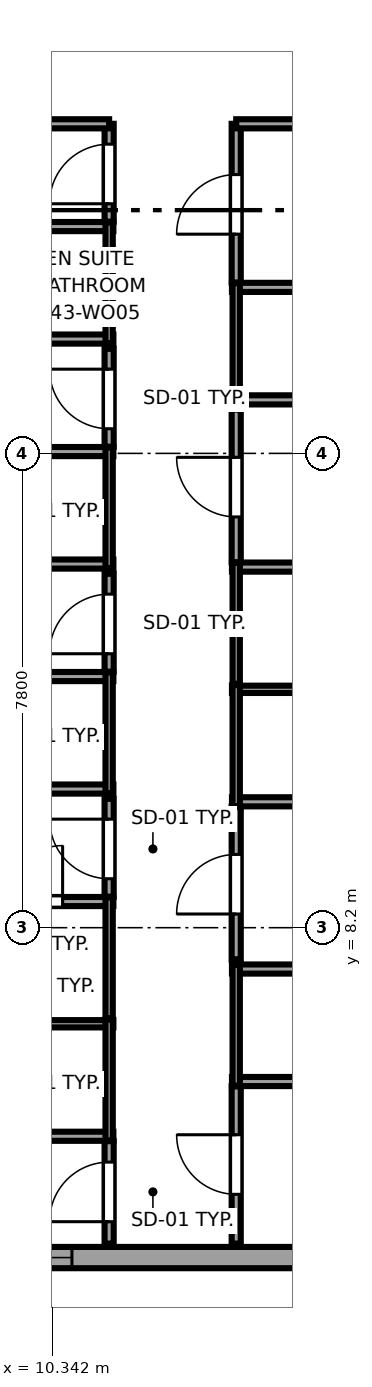
"""IFC4 building model, lengths in metres.
Left out: names, types, materials, properties, quantities, classifications, styles, units other than length and angle.
Written with IfcOpenShell. Run it as: python <this file> out.ifc"""

import sys

from ifc_helpers import new_model, si_unit, direction, frame, frame_2d, origin, place, context, subcontext, project, spatial, rectangle, extrude, source, transform, mapped, element, fill, save


model = new_model("IFC4")
c1 = context("Model", 3, precision=1e-05, world=origin(), true_north=direction((0.0, 1.0)))
c2 = subcontext(c1, "Body", "Model", "MODEL_VIEW")
j1 = project(units=[si_unit("LENGTHUNIT", "METRE"), si_unit("PLANEANGLEUNIT", "RADIAN")], contexts=[c1])
p1 = place(None, origin())
s1 = spatial("IfcSite", under=j1, at=p1, CompositionType="ELEMENT")
p2 = place(p1, origin())
s2 = spatial("IfcBuilding", under=s1, at=p2, CompositionType="ELEMENT")
p3 = place(p2, frame((0.0, 0.0, 164.8)))
s3 = spatial("IfcBuildingStorey", under=s2, at=p3, CompositionType="ELEMENT", Elevation=164.8)
p4 = place(p3, frame((7.017, 2.775, 0.0), z_axis=(0.0, 0.0, 1.0), x_axis=(1.0, 0.0, 0.0)))
e1 = element("IfcWall", 1, at=p4, inside=s3, PredefinedType="SOLIDWALL", context=c2, shape_type="SweptSolid", body=[
    extrude(rectangle(XDim=15.608, YDim=0.35, at=frame_2d((7.804, 0.0))), origin(), (0.0, 0.0, 1.0), 3.37),
])
p5 = place(p4, frame((1.251, 0.0, 0.68)))
e2 = element("IfcOpeningElement", 2, at=p5, cuts=e1, PredefinedType="OPENING", context=c2, shape_type="SweptSolid", body=[
    extrude(rectangle(XDim=2.4, YDim=1.9, at=frame_2d((1.2, 0.95))), frame((0.0, 0.185, 0.0), z_axis=(0.0, -1.0, 0.0), x_axis=(1.0, 0.0, 0.0)), (0.0, 0.0, 1.0), 0.37),
])
p6 = place(p4, frame((11.407, 0.0, 0.68)))
e3 = element("IfcOpeningElement", 3, at=p6, cuts=e1, PredefinedType="OPENING", context=c2, shape_type="SweptSolid", body=[
    extrude(rectangle(XDim=2.4, YDim=1.9, at=frame_2d((1.2, 0.95))), frame((0.0, 0.185, 0.0), z_axis=(0.0, -1.0, 0.0), x_axis=(1.0, 0.0, 0.0)), (0.0, 0.0, 1.0), 0.37),
])
p7 = place(p3, frame((8.76, 4.77, 0.0), z_axis=(0.0, 0.0, 1.0), x_axis=(1.0, 0.0, 0.0)))
e4 = element("IfcWall", 4, at=p7, inside=s3, PredefinedType="PARTITIONING", context=c2, shape_type="SweptSolid", body=[
    extrude(rectangle(XDim=2.59, YDim=0.15, at=frame_2d((1.295, 0.0))), origin(), (0.0, 0.0, 1.0), 3.37),
])
p8 = place(p3, frame((8.76, 6.62, 0.0), z_axis=(0.0, 0.0, 1.0), x_axis=(1.0, 0.0, 0.0)))
e5 = element("IfcWall", 5, at=p8, inside=s3, PredefinedType="PLUMBINGWALL", context=c2, shape_type="SweptSolid", body=[
    extrude(rectangle(XDim=2.59, YDim=0.12, at=frame_2d((1.295, 0.0))), origin(), (0.0, 0.0, 1.0), 3.37),
])
p9 = place(p3, frame((11.28, 4.7, 0.0), z_axis=(0.0, 0.0, 1.0), x_axis=(0.0, 1.0, 0.0)))
e6 = element("IfcWall", 6, at=p9, inside=s3, PredefinedType="PLUMBINGWALL", context=c2, shape_type="SweptSolid", body=[
    extrude(rectangle(XDim=1.99, YDim=0.12, at=frame_2d((0.995, 0.0))), origin(), (0.0, 0.0, 1.0), 3.37),
])
p10 = place(p3, frame((8.76, 8.63, 0.0), z_axis=(0.0, 0.0, 1.0), x_axis=(1.0, 0.0, 0.0)))
e7 = element("IfcWall", 7, at=p10, inside=s3, PredefinedType="PARTITIONING", context=c2, shape_type="SweptSolid", body=[
    extrude(rectangle(XDim=2.59, YDim=0.15, at=frame_2d((1.295, 0.0))), origin(), (0.0, 0.0, 1.0), 3.37),
])
p11 = place(p10, frame((0.835, 0.0, 0.0)))
e8 = element("IfcOpeningElement", 8, at=p11, cuts=e7, PredefinedType="OPENING", context=c2, shape_type="SweptSolid", body=[
    extrude(rectangle(XDim=0.92, YDim=2.01, at=frame_2d((0.46, 1.005))), frame((0.0, 0.085, 0.0), z_axis=(0.0, -1.0, 0.0), x_axis=(1.0, 0.0, 0.0)), (0.0, 0.0, 1.0), 0.17),
])
p12 = place(p3, frame((11.28, 6.71, 0.0), z_axis=(0.0, 0.0, 1.0), x_axis=(0.0, 1.0, 0.0)))
e9 = element("IfcWall", 9, at=p12, inside=s3, PredefinedType="PLUMBINGWALL", context=c2, shape_type="SweptSolid", body=[
    extrude(rectangle(XDim=1.99, YDim=0.12, at=frame_2d((0.995, 0.0))), origin(), (0.0, 0.0, 1.0), 3.001),
])
p13 = place(p3, frame((3.005, 10.48, 0.0), z_axis=(0.0, 0.0, 1.0), x_axis=(1.0, 0.0, 0.0)))
e10 = element("IfcWall", 10, at=p13, inside=s3, PredefinedType="PARTITIONING", context=c2, shape_type="SweptSolid", body=[
    extrude(rectangle(XDim=8.345, YDim=0.15, at=frame_2d((4.173, 0.0))), origin(), (0.0, 0.0, 1.0), 3.37),
])
p14 = place(p3, frame((8.76, 12.33, 0.0), z_axis=(0.0, 0.0, 1.0), x_axis=(1.0, 0.0, 0.0)))
e11 = element("IfcWall", 11, at=p14, inside=s3, PredefinedType="PARTITIONING", context=c2, shape_type="SweptSolid", body=[
    extrude(rectangle(XDim=2.59, YDim=0.15, at=frame_2d((1.295, 0.0))), origin(), (0.0, 0.0, 1.0), 3.37),
])
p15 = place(p3, frame((11.28, 10.41, 0.0), z_axis=(0.0, 0.0, 1.0), x_axis=(0.0, 1.0, 0.0)))
e12 = element("IfcWall", 12, at=p15, inside=s3, PredefinedType="PLUMBINGWALL", context=c2, shape_type="SweptSolid", body=[
    extrude(rectangle(XDim=1.99, YDim=0.12, at=frame_2d((0.995, 0.0))), origin(), (0.0, 0.0, 1.0), 3.001),
])
p16 = place(p3, frame((3.005, 14.18, 0.0), z_axis=(0.0, 0.0, 1.0), x_axis=(1.0, 0.0, 0.0)))
e13 = element("IfcWall", 13, at=p16, inside=s3, PredefinedType="PARTITIONING", context=c2, shape_type="SweptSolid", body=[
    extrude(rectangle(XDim=8.345, YDim=0.15, at=frame_2d((4.173, 0.0))), origin(), (0.0, 0.0, 1.0), 3.37),
])
p17 = place(p3, frame((8.76, 16.03, 0.0), z_axis=(0.0, 0.0, 1.0), x_axis=(1.0, 0.0, 0.0)))
e14 = element("IfcWall", 14, at=p17, inside=s3, PredefinedType="PARTITIONING", context=c2, shape_type="SweptSolid", body=[
    extrude(rectangle(XDim=2.59, YDim=0.15, at=frame_2d((1.295, 0.0))), origin(), (0.0, 0.0, 1.0), 2.758),
])
p18 = place(p3, frame((11.28, 14.11, 0.0), z_axis=(0.0, 0.0, 1.0), x_axis=(0.0, 1.0, 0.0)))
e15 = element("IfcWall", 15, at=p18, inside=s3, PredefinedType="PLUMBINGWALL", context=c2, shape_type="SweptSolid", body=[
    extrude(rectangle(XDim=1.99, YDim=0.12, at=frame_2d((0.995, 0.0))), origin(), (0.0, 0.0, 1.0), 3.001),
])
p19 = place(p3, frame((3.005, 17.88, 0.0), z_axis=(0.0, 0.0, 1.0), x_axis=(1.0, 0.0, 0.0)))
e16 = element("IfcWall", 16, at=p19, inside=s3, PredefinedType="PARTITIONING", context=c2, shape_type="SweptSolid", body=[
    extrude(rectangle(XDim=8.345, YDim=0.15, at=frame_2d((4.173, 0.0))), origin(), (0.0, 0.0, 1.0), 3.37),
])
p20 = place(p3, frame((8.76, 19.73, 0.0), z_axis=(0.0, 0.0, 1.0), x_axis=(1.0, 0.0, 0.0)))
e17 = element("IfcWall", 17, at=p20, inside=s3, PredefinedType="PARTITIONING", context=c2, shape_type="SweptSolid", body=[
    extrude(rectangle(XDim=2.59, YDim=0.15, at=frame_2d((1.295, 0.0))), origin(), (0.0, 0.0, 1.0), 3.37),
])
p21 = place(p3, frame((11.28, 17.81, 0.0), z_axis=(0.0, 0.0, 1.0), x_axis=(0.0, 1.0, 0.0)))
e18 = element("IfcWall", 18, at=p21, inside=s3, PredefinedType="PLUMBINGWALL", context=c2, shape_type="SweptSolid", body=[
    extrude(rectangle(XDim=1.99, YDim=0.12, at=frame_2d((0.995, 0.0))), origin(), (0.0, 0.0, 1.0), 3.001),
])
for number, where, z_axis, x_axis in (
    (19, (13.3, 5.67, 0.0), (0.0, 0.0, 1.0), (1.0, 0.0, 0.0)),
    (20, (13.3, 7.52, 0.0), (0.0, 0.0, 1.0), (1.0, 0.0, 0.0)),
):
    element("IfcWall", number, at=place(p3, frame(where, z_axis=z_axis, x_axis=x_axis)), inside=s3, PredefinedType="PARTITIONING", context=c2, shape_type="SweptSolid", body=[
        extrude(rectangle(XDim=2.59, YDim=0.15, at=frame_2d((1.295, 0.0))), origin(), (0.0, 0.0, 1.0), 3.37),
    ])
p22 = place(p3, frame((13.37, 5.6, 0.0), z_axis=(0.0, 0.0, 1.0), x_axis=(0.0, 1.0, 0.0)))
e21 = element("IfcWall", 21, at=p22, inside=s3, PredefinedType="PLUMBINGWALL", context=c2, shape_type="SweptSolid", body=[
    extrude(rectangle(XDim=1.99, YDim=0.12, at=frame_2d((0.995, 0.0))), origin(), (0.0, 0.0, 1.0), 3.37),
])
p23 = place(p3, frame((13.3, 10.27, 0.0), z_axis=(0.0, 0.0, 1.0), x_axis=(1.0, 0.0, 0.0)))
e22 = element("IfcWall", 22, at=p23, inside=s3, PredefinedType="PARTITIONING", context=c2, shape_type="SweptSolid", body=[
    extrude(rectangle(XDim=2.59, YDim=0.15, at=frame_2d((1.295, 0.0))), origin(), (0.0, 0.0, 1.0), 3.37),
])
p24 = place(p3, frame((13.3, 12.12, 0.0), z_axis=(0.0, 0.0, 1.0), x_axis=(1.0, 0.0, 0.0)))
e23 = element("IfcWall", 23, at=p24, inside=s3, PredefinedType="PLUMBINGWALL", context=c2, shape_type="SweptSolid", body=[
    extrude(rectangle(XDim=2.59, YDim=0.12, at=frame_2d((1.295, 0.0))), origin(), (0.0, 0.0, 1.0), 3.37),
])
p25 = place(p3, frame((13.37, 10.2, 0.0), z_axis=(0.0, 0.0, 1.0), x_axis=(0.0, 1.0, 0.0)))
e24 = element("IfcWall", 24, at=p25, inside=s3, PredefinedType="PLUMBINGWALL", context=c2, shape_type="SweptSolid", body=[
    extrude(rectangle(XDim=1.99, YDim=0.12, at=frame_2d((0.995, 0.0))), origin(), (0.0, 0.0, 1.0), 3.37),
])
p26 = place(p3, frame((13.3, 14.13, 0.0), z_axis=(0.0, 0.0, 1.0), x_axis=(1.0, 0.0, 0.0)))
e25 = element("IfcWall", 25, at=p26, inside=s3, PredefinedType="PARTITIONING", context=c2, shape_type="SweptSolid", body=[
    extrude(rectangle(XDim=2.59, YDim=0.15, at=frame_2d((1.295, 0.0))), origin(), (0.0, 0.0, 1.0), 3.37),
])
p27 = place(p3, frame((13.37, 12.21, 0.0), z_axis=(0.0, 0.0, 1.0), x_axis=(0.0, 1.0, 0.0)))
e26 = element("IfcWall", 26, at=p27, inside=s3, PredefinedType="PLUMBINGWALL", context=c2, shape_type="SweptSolid", body=[
    extrude(rectangle(XDim=1.99, YDim=0.12, at=frame_2d((0.995, 0.0))), origin(), (0.0, 0.0, 1.0), 3.37),
])
p28 = place(p3, frame((13.3, 16.88, 0.0), z_axis=(0.0, 0.0, 1.0), x_axis=(1.0, 0.0, 0.0)))
e27 = element("IfcWall", 27, at=p28, inside=s3, PredefinedType="PARTITIONING", context=c2, shape_type="SweptSolid", body=[
    extrude(rectangle(XDim=9.05, YDim=0.15, at=frame_2d((4.525, 0.0))), origin(), (0.0, 0.0, 1.0), 3.37),
])
p29 = place(p3, frame((13.3, 18.73, 0.0), z_axis=(0.0, 0.0, 1.0), x_axis=(1.0, 0.0, 0.0)))
e28 = element("IfcWall", 28, at=p29, inside=s3, PredefinedType="PARTITIONING", context=c2, shape_type="SweptSolid", body=[
    extrude(rectangle(XDim=2.59, YDim=0.15, at=frame_2d((1.295, 0.0))), origin(), (0.0, 0.0, 1.0), 3.37),
])
p30 = place(p3, frame((13.37, 16.81, 0.0), z_axis=(0.0, 0.0, 1.0), x_axis=(0.0, 1.0, 0.0)))
e29 = element("IfcWall", 29, at=p30, inside=s3, PredefinedType="PLUMBINGWALL", context=c2, shape_type="SweptSolid", body=[
    extrude(rectangle(XDim=1.99, YDim=0.12, at=frame_2d((0.995, 0.0))), origin(), (0.0, 0.0, 1.0), 3.37),
])
p31 = place(p3, frame((11.28, 3.005, 0.0), z_axis=(0.0, 0.0, 1.0), x_axis=(0.0, 1.0, 0.0)))
e30 = element("IfcWall", 30, at=p31, inside=s3, PredefinedType="PARTITIONING", context=c2, shape_type="SweptSolid", body=[
    extrude(rectangle(XDim=1.685, YDim=0.15, at=frame_2d((0.843, 0.0))), origin(), (0.0, 0.0, 1.0), 3.37),
])
p32 = place(p31, frame((0.36, 0.0, 0.0)))
e31 = element("IfcOpeningElement", 31, at=p32, cuts=e30, PredefinedType="OPENING", context=c2, shape_type="SweptSolid", body=[
    extrude(rectangle(XDim=0.98, YDim=2.12, at=frame_2d((0.49, 1.06))), frame((0.0, 0.085, 0.0), z_axis=(0.0, -1.0, 0.0), x_axis=(1.0, 0.0, 0.0)), (0.0, 0.0, 1.0), 0.17),
])
p33 = place(p3, frame((11.28, 8.71, 0.0), z_axis=(0.0, 0.0, 1.0), x_axis=(0.0, 1.0, 0.0)))
e32 = element("IfcWall", 32, at=p33, inside=s3, PredefinedType="PARTITIONING", context=c2, shape_type="SweptSolid", body=[
    extrude(rectangle(XDim=1.61, YDim=0.15, at=frame_2d((0.805, 0.0))), origin(), (0.0, 0.0, 1.0), 3.001),
])
p34 = place(p33, frame((0.295, 0.0, 0.0)))
e33 = element("IfcOpeningElement", 33, at=p34, cuts=e32, PredefinedType="OPENING", context=c2, shape_type="SweptSolid", body=[
    extrude(rectangle(XDim=0.98, YDim=2.12, at=frame_2d((0.49, 1.06))), frame((0.0, 0.085, 0.0), z_axis=(0.0, -1.0, 0.0), x_axis=(1.0, 0.0, 0.0)), (0.0, 0.0, 1.0), 0.17),
])
p35 = place(p3, frame((11.28, 12.41, 0.0), z_axis=(0.0, 0.0, 1.0), x_axis=(0.0, 1.0, 0.0)))
e34 = element("IfcWall", 34, at=p35, inside=s3, PredefinedType="PARTITIONING", context=c2, shape_type="SweptSolid", body=[
    extrude(rectangle(XDim=1.61, YDim=0.15, at=frame_2d((0.805, 0.0))), origin(), (0.0, 0.0, 1.0), 3.001),
])
p36 = place(p35, frame((0.295, 0.0, 0.0)))
e35 = element("IfcOpeningElement", 35, at=p36, cuts=e34, PredefinedType="OPENING", context=c2, shape_type="SweptSolid", body=[
    extrude(rectangle(XDim=0.98, YDim=2.12, at=frame_2d((0.49, 1.06))), frame((0.0, 0.085, 0.0), z_axis=(0.0, -1.0, 0.0), x_axis=(1.0, 0.0, 0.0)), (0.0, 0.0, 1.0), 0.17),
])
p37 = place(p3, frame((11.28, 16.11, 0.0), z_axis=(0.0, 0.0, 1.0), x_axis=(0.0, 1.0, 0.0)))
e36 = element("IfcWall", 36, at=p37, inside=s3, PredefinedType="PARTITIONING", context=c2, shape_type="SweptSolid", body=[
    extrude(rectangle(XDim=1.61, YDim=0.15, at=frame_2d((0.805, 0.0))), origin(), (0.0, 0.0, 1.0), 3.001),
])
p38 = place(p37, frame((0.295, 0.0, 0.0)))
e37 = element("IfcOpeningElement", 37, at=p38, cuts=e36, PredefinedType="OPENING", context=c2, shape_type="SweptSolid", body=[
    extrude(rectangle(XDim=0.98, YDim=2.12, at=frame_2d((0.49, 1.06))), frame((0.0, 0.085, 0.0), z_axis=(0.0, -1.0, 0.0), x_axis=(1.0, 0.0, 0.0)), (0.0, 0.0, 1.0), 0.17),
])
p39 = place(p3, frame((11.28, 19.81, 0.0), z_axis=(0.0, 0.0, 1.0), x_axis=(0.0, 1.0, 0.0)))
e38 = element("IfcWall", 38, at=p39, inside=s3, PredefinedType="PARTITIONING", context=c2, shape_type="SweptSolid", body=[
    extrude(rectangle(XDim=1.61, YDim=0.15, at=frame_2d((0.805, 0.0))), origin(), (0.0, 0.0, 1.0), 3.001),
])
p40 = place(p39, frame((0.295, 0.0, 0.0)))
e39 = element("IfcOpeningElement", 39, at=p40, cuts=e38, PredefinedType="OPENING", context=c2, shape_type="SweptSolid", body=[
    extrude(rectangle(XDim=0.98, YDim=2.12, at=frame_2d((0.49, 1.06))), frame((0.0, 0.085, 0.0), z_axis=(0.0, -1.0, 0.0), x_axis=(1.0, 0.0, 0.0)), (0.0, 0.0, 1.0), 0.17),
])
p41 = place(p3, frame((3.005, 21.42, 0.0), z_axis=(0.0, 0.0, 1.0), x_axis=(1.0, 0.0, 0.0)))
e40 = element("IfcWall", 40, at=p41, inside=s3, PredefinedType="PARTITIONING", context=c2, shape_type="SweptSolid", body=[
    extrude(rectangle(XDim=8.275, YDim=0.15, at=frame_2d((4.138, 0.0))), origin(), (0.0, 0.0, 1.0), 3.37),
])
p42 = place(p3, frame((13.37, 3.005, 0.0), z_axis=(0.0, 0.0, 1.0), x_axis=(0.0, 1.0, 0.0)))
e41 = element("IfcWall", 41, at=p42, inside=s3, PredefinedType="PARTITIONING", context=c2, shape_type="SweptSolid", body=[
    extrude(rectangle(XDim=2.585, YDim=0.15, at=frame_2d((1.292, 0.0))), origin(), (0.0, 0.0, 1.0), 3.37),
])
p43 = place(p42, frame((0.81, 0.0, 0.0)))
e42 = element("IfcOpeningElement", 42, at=p43, cuts=e41, PredefinedType="OPENING", context=c2, shape_type="SweptSolid", body=[
    extrude(rectangle(XDim=0.98, YDim=2.12, at=frame_2d((0.49, 1.06))), frame((0.0, 0.085, 0.0), z_axis=(0.0, -1.0, 0.0), x_axis=(1.0, 0.0, 0.0)), (0.0, 0.0, 1.0), 0.17),
])
p44 = place(p3, frame((13.37, 7.68, 0.0), z_axis=(0.0, 0.0, 1.0), x_axis=(0.0, 1.0, 0.0)))
e43 = element("IfcWall", 43, at=p44, inside=s3, PredefinedType="PARTITIONING", context=c2, shape_type="SweptSolid", body=[
    extrude(rectangle(XDim=2.51, YDim=0.15, at=frame_2d((1.255, 0.0))), origin(), (0.0, 0.0, 1.0), 3.37),
])
p45 = place(p44, frame((0.745, 0.0, 0.0)))
e44 = element("IfcOpeningElement", 44, at=p45, cuts=e43, PredefinedType="OPENING", context=c2, shape_type="SweptSolid", body=[
    extrude(rectangle(XDim=0.98, YDim=2.12, at=frame_2d((0.49, 1.06))), frame((0.0, 0.085, 0.0), z_axis=(0.0, -1.0, 0.0), x_axis=(1.0, 0.0, 0.0)), (0.0, 0.0, 1.0), 0.17),
])
p46 = place(p3, frame((13.37, 14.21, 0.0), z_axis=(0.0, 0.0, 1.0), x_axis=(0.0, 1.0, 0.0)))
e45 = element("IfcWall", 45, at=p46, inside=s3, PredefinedType="PARTITIONING", context=c2, shape_type="SweptSolid", body=[
    extrude(rectangle(XDim=2.51, YDim=0.15, at=frame_2d((1.255, 0.0))), origin(), (0.0, 0.0, 1.0), 3.37),
])
p47 = place(p46, frame((0.745, 0.0, 0.0)))
e46 = element("IfcOpeningElement", 46, at=p47, cuts=e45, PredefinedType="OPENING", context=c2, shape_type="SweptSolid", body=[
    extrude(rectangle(XDim=0.98, YDim=2.12, at=frame_2d((0.49, 1.06))), frame((0.0, 0.085, 0.0), z_axis=(0.0, -1.0, 0.0), x_axis=(1.0, 0.0, 0.0)), (0.0, 0.0, 1.0), 0.17),
])
p48 = place(p3, frame((13.37, 18.81, 0.0), z_axis=(0.0, 0.0, 1.0), x_axis=(0.0, 1.0, 0.0)))
e47 = element("IfcWall", 47, at=p48, inside=s3, PredefinedType="PARTITIONING", context=c2, shape_type="SweptSolid", body=[
    extrude(rectangle(XDim=2.61, YDim=0.15, at=frame_2d((1.305, 0.0))), origin(), (0.0, 0.0, 1.0), 3.37),
])
p49 = place(p48, frame((0.795, 0.0, 0.0)))
e48 = element("IfcOpeningElement", 48, at=p49, cuts=e47, PredefinedType="OPENING", context=c2, shape_type="SweptSolid", body=[
    extrude(rectangle(XDim=0.98, YDim=2.12, at=frame_2d((0.49, 1.06))), frame((0.0, 0.085, 0.0), z_axis=(0.0, -1.0, 0.0), x_axis=(1.0, 0.0, 0.0)), (0.0, 0.0, 1.0), 0.17),
])
p50 = place(p3, frame((13.37, 21.42, 0.0), z_axis=(0.0, 0.0, 1.0), x_axis=(1.0, 0.0, 0.0)))
e49 = element("IfcWall", 49, at=p50, inside=s3, PredefinedType="PARTITIONING", context=c2, shape_type="SweptSolid", body=[
    extrude(rectangle(XDim=8.98, YDim=0.15, at=frame_2d((4.49, 0.0))), origin(), (0.0, 0.0, 1.0), 3.37),
])
m1 = source(origin(), c2, "Body", "SweptSolid", [
    extrude(rectangle(XDim=2.4, YDim=1.9, at=frame_2d((1.2, 0.95))), frame((0.0, 0.09, 0.0), z_axis=(0.0, -1.0, 0.0), x_axis=(1.0, 0.0, 0.0)), (0.0, 0.0, 1.0), 0.06),
])
p51 = place(p5, origin())
e50 = element("IfcWindow", 50, at=p51, inside=s3, PartitioningType="TRIPLE_PANEL_HORIZONTAL", PredefinedType="WINDOW", context=c2, shape_type="MappedRepresentation", body=[
    mapped(m1, transform((0.0, 0.0, 0.0), x_axis=(1.0, 0.0, 0.0), y_axis=(0.0, 1.0, 0.0), z_axis=(0.0, 0.0, 1.0), scale=1.0)),
])
fill(e2, e50)
m2 = source(origin(), c2, "Body", "SweptSolid", [
    extrude(rectangle(XDim=0.92, YDim=2.01, at=frame_2d((0.46, 1.005))), frame((0.0, 0.025, 0.0), z_axis=(0.0, -1.0, 0.0), x_axis=(1.0, 0.0, 0.0)), (0.0, 0.0, 1.0), 0.05),
])
p52 = place(p11, origin())
e51 = element("IfcDoor", 51, at=p52, inside=s3, OperationType="SINGLE_SWING_RIGHT", PredefinedType="DOOR", context=c2, shape_type="MappedRepresentation", body=[
    mapped(m2, transform((0.0, 0.0, 0.0), x_axis=(1.0, 0.0, 0.0), y_axis=(0.0, 1.0, 0.0), z_axis=(0.0, 0.0, 1.0), scale=1.0)),
])
fill(e8, e51)
m3 = source(origin(), c2, "Body", "SweptSolid", [
    extrude(rectangle(XDim=0.98, YDim=2.12, at=frame_2d((0.49, 1.06))), frame((0.0, 0.025, 0.0), z_axis=(0.0, -1.0, 0.0), x_axis=(1.0, 0.0, 0.0)), (0.0, 0.0, 1.0), 0.05),
])
p53 = place(p32, origin())
e52 = element("IfcDoor", 52, at=p53, inside=s3, OperationType="SINGLE_SWING_LEFT", PredefinedType="DOOR", context=c2, shape_type="MappedRepresentation", body=[
    mapped(m3, transform((0.0, 0.0, 0.0), x_axis=(1.0, 0.0, 0.0), y_axis=(0.0, 1.0, 0.0), z_axis=(0.0, 0.0, 1.0), scale=1.0)),
])
fill(e31, e52)
p54 = place(p34, origin())
e53 = element("IfcDoor", 53, at=p54, inside=s3, OperationType="SINGLE_SWING_RIGHT", PredefinedType="DOOR", context=c2, shape_type="MappedRepresentation", body=[
    mapped(m3, transform((0.0, 0.0, 0.0), x_axis=(1.0, 0.0, 0.0), y_axis=(0.0, 1.0, 0.0), z_axis=(0.0, 0.0, 1.0), scale=1.0)),
])
fill(e33, e53)
p55 = place(p36, origin())
e54 = element("IfcDoor", 54, at=p55, inside=s3, OperationType="SINGLE_SWING_LEFT", PredefinedType="DOOR", context=c2, shape_type="MappedRepresentation", body=[
    mapped(m3, transform((0.0, 0.0, 0.0), x_axis=(1.0, 0.0, 0.0), y_axis=(0.0, 1.0, 0.0), z_axis=(0.0, 0.0, 1.0), scale=1.0)),
])
fill(e35, e54)
p56 = place(p38, origin())
e55 = element("IfcDoor", 55, at=p56, inside=s3, OperationType="SINGLE_SWING_RIGHT", PredefinedType="DOOR", context=c2, shape_type="MappedRepresentation", body=[
    mapped(m3, transform((0.0, 0.0, 0.0), x_axis=(1.0, 0.0, 0.0), y_axis=(0.0, 1.0, 0.0), z_axis=(0.0, 0.0, 1.0), scale=1.0)),
])
fill(e37, e55)
p57 = place(p40, origin())
e56 = element("IfcDoor", 56, at=p57, inside=s3, OperationType="SINGLE_SWING_LEFT", PredefinedType="DOOR", context=c2, shape_type="MappedRepresentation", body=[
    mapped(m3, transform((0.0, 0.0, 0.0), x_axis=(1.0, 0.0, 0.0), y_axis=(0.0, 1.0, 0.0), z_axis=(0.0, 0.0, 1.0), scale=1.0)),
])
fill(e39, e56)
p58 = place(p43, origin())
e57 = element("IfcDoor", 57, at=p58, inside=s3, OperationType="SINGLE_SWING_RIGHT", PredefinedType="DOOR", context=c2, shape_type="MappedRepresentation", body=[
    mapped(m3, transform((0.0, 0.0, 0.0), x_axis=(1.0, 0.0, 0.0), y_axis=(0.0, 1.0, 0.0), z_axis=(0.0, 0.0, 1.0), scale=1.0)),
])
fill(e42, e57)
p59 = place(p45, origin())
e58 = element("IfcDoor", 58, at=p59, inside=s3, OperationType="SINGLE_SWING_LEFT", PredefinedType="DOOR", context=c2, shape_type="MappedRepresentation", body=[
    mapped(m3, transform((0.0, 0.0, 0.0), x_axis=(1.0, 0.0, 0.0), y_axis=(0.0, 1.0, 0.0), z_axis=(0.0, 0.0, 1.0), scale=1.0)),
])
fill(e44, e58)
p60 = place(p47, origin())
e59 = element("IfcDoor", 59, at=p60, inside=s3, OperationType="SINGLE_SWING_RIGHT", PredefinedType="DOOR", context=c2, shape_type="MappedRepresentation", body=[
    mapped(m3, transform((0.0, 0.0, 0.0), x_axis=(1.0, 0.0, 0.0), y_axis=(0.0, 1.0, 0.0), z_axis=(0.0, 0.0, 1.0), scale=1.0)),
])
fill(e46, e59)
p61 = place(p49, origin())
e60 = element("IfcDoor", 60, at=p61, inside=s3, OperationType="SINGLE_SWING_LEFT", PredefinedType="DOOR", context=c2, shape_type="MappedRepresentation", body=[
    mapped(m3, transform((0.0, 0.0, 0.0), x_axis=(1.0, 0.0, 0.0), y_axis=(0.0, 1.0, 0.0), z_axis=(0.0, 0.0, 1.0), scale=1.0)),
])
fill(e48, e60)
save(model, sys.argv[1])
